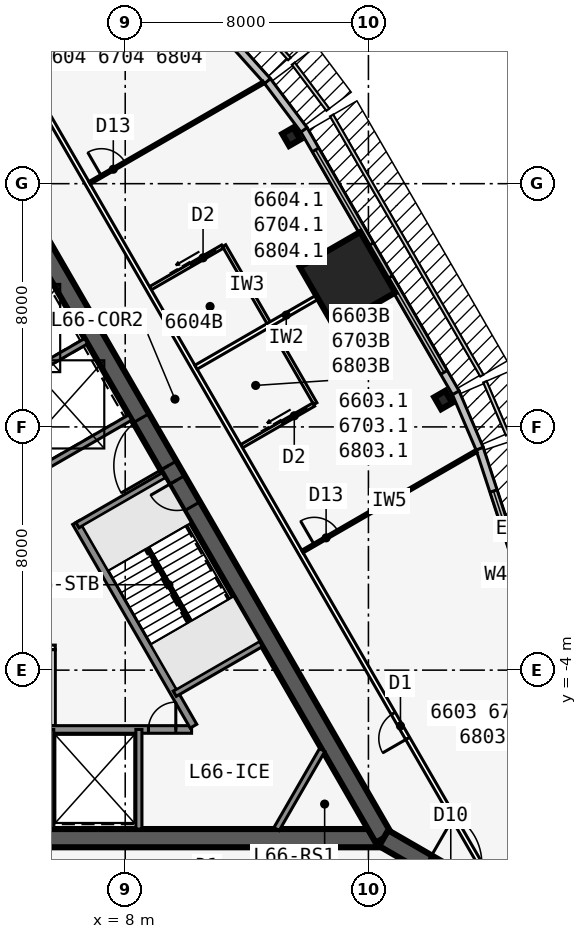
"""IFC4 building model, lengths in metres.
Left out: names, types, materials, properties, quantities, classifications, styles, units other than length and angle.
Written with IfcOpenShell. Run it as: python <this file> out.ifc"""

import sys

from ifc_helpers import new_model, si_unit, direction, frame, frame_2d, origin, origin_2d, place, context, subcontext, project, spatial, rectangle, i_section, extrude, element, fill, save


model = new_model("IFC4")
c1 = context("Model", 3, precision=1e-05, world=origin(), true_north=direction((0.0, 1.0)))
c2 = subcontext(c1, "Body", "Model", "MODEL_VIEW")
j1 = project(units=[si_unit("LENGTHUNIT", "METRE"), si_unit("PLANEANGLEUNIT", "RADIAN")], contexts=[c1])
p1 = place(None, origin())
s1 = spatial("IfcSite", under=j1, at=p1, CompositionType="ELEMENT")
p2 = place(p1, origin())
s2 = spatial("IfcBuilding", under=s1, at=p2, CompositionType="ELEMENT")
p3 = place(p2, frame((0.0, 0.0, 250.1)))
s3 = spatial("IfcBuildingStorey", under=s2, at=p3, CompositionType="ELEMENT", Elevation=250.1)
p4 = place(p3, frame((-16.5, -9.526, 0.0), z_axis=(0.0, 0.0, 1.0), x_axis=(1.0, 0.0, 0.0)))
e1 = element("IfcWall", 1, at=p4, inside=s3, PredefinedType="SHEAR", context=c2, shape_type="SweptSolid", body=[
    extrude(rectangle(XDim=33.0, YDim=0.6, at=frame_2d((16.5, 0.0))), origin(), (0.0, 0.0, 1.0), 3.6),
])
p5 = place(p4, frame((14.05, 0.0, 0.0)))
e2 = element("IfcOpeningElement", 2, at=p5, cuts=e1, PredefinedType="OPENING", context=c2, shape_type="SweptSolid", body=[
    extrude(rectangle(XDim=1.8, YDim=2.13, at=frame_2d((0.9, 1.065))), frame((0.0, 0.31, 0.0), z_axis=(0.0, -1.0, 0.0), x_axis=(1.0, 0.0, 0.0)), (0.0, 0.0, 1.0), 0.62),
])
p6 = place(p3, frame((-0.55, -5.951, 0.0), z_axis=(0.0, 0.0, 1.0), x_axis=(1.0, 0.0, 0.0)))
e3 = element("IfcWall", 3, at=p6, inside=s3, PredefinedType="SOLIDWALL", context=c2, shape_type="SweptSolid", body=[
    extrude(rectangle(XDim=10.733, YDim=0.25, at=frame_2d((5.366, 0.0))), origin(), (0.0, 0.0, 1.0), 3.435),
])
p7 = place(p6, frame((9.314, 0.0, 0.0)))
e4 = element("IfcOpeningElement", 4, at=p7, cuts=e3, PredefinedType="OPENING", context=c2, shape_type="SweptSolid", body=[
    extrude(rectangle(XDim=0.9, YDim=2.13, at=frame_2d((0.45, 1.065))), frame((0.0, 0.135, 0.0), z_axis=(0.0, -1.0, 0.0), x_axis=(1.0, 0.0, 0.0)), (0.0, 0.0, 1.0), 0.27),
])
p8 = place(p6, frame((1.05, 0.0, 0.0)))
e5 = element("IfcOpeningElement", 5, at=p8, cuts=e3, PredefinedType="OPENING", context=c2, shape_type="SweptSolid", body=[
    extrude(rectangle(XDim=1.1, YDim=2.13, at=frame_2d((0.55, 1.065))), frame((0.0, 0.135, 0.0), z_axis=(0.0, -1.0, 0.0), x_axis=(1.0, 0.0, 0.0)), (0.0, 0.0, 1.0), 0.27),
])
p9 = place(p6, frame((4.05, 0.0, 0.0)))
e6 = element("IfcOpeningElement", 6, at=p9, cuts=e3, PredefinedType="OPENING", context=c2, shape_type="SweptSolid", body=[
    extrude(rectangle(XDim=1.1, YDim=2.13, at=frame_2d((0.55, 1.065))), frame((0.0, 0.135, 0.0), z_axis=(0.0, -1.0, 0.0), x_axis=(1.0, 0.0, 0.0)), (0.0, 0.0, 1.0), 0.27),
])
for number, where, z_axis, x_axis in (
    (7, (5.55, -5.951, 0.0), (0.0, 0.0, 1.0), (0.0, -1.0, 0.0)),
    (8, (8.45, -5.951, 0.0), (0.0, 0.0, 1.0), (0.0, -1.0, 0.0)),
):
    element("IfcWall", number, at=place(p3, frame(where, z_axis=z_axis, x_axis=x_axis)), inside=s3, PredefinedType="SOLIDWALL", context=c2, shape_type="SweptSolid", body=[
        extrude(rectangle(XDim=3.275, YDim=0.2, at=frame_2d((1.637, 0.0))), origin(), (0.0, 0.0, 1.0), 3.435),
    ])
p10 = place(p3, frame((16.5, -9.526, 0.0), z_axis=(0.0, 0.0, 1.0), x_axis=(-0.499999749417, 0.866025548458, 0.0)))
e9 = element("IfcWall", 9, at=p10, inside=s3, PredefinedType="SHEAR", context=c2, shape_type="SweptSolid", body=[
    extrude(rectangle(XDim=33.0, YDim=0.6, at=frame_2d((16.5, 0.0))), origin(), (0.0, 0.0, 1.0), 3.6),
])
p11 = place(p10, frame((14.15, 0.0, 0.0)))
e10 = element("IfcOpeningElement", 10, at=p11, cuts=e9, PredefinedType="OPENING", context=c2, shape_type="SweptSolid", body=[
    extrude(rectangle(XDim=1.8, YDim=2.13, at=frame_2d((0.9, 1.065))), frame((0.0, 0.31, 0.0), z_axis=(0.0, -1.0, 0.0), x_axis=(1.0, 0.0, 0.0)), (0.0, 0.0, 1.0), 0.62),
])
p12 = place(p10, frame((12.6, 0.0, 0.0)))
e11 = element("IfcOpeningElement", 11, at=p12, cuts=e9, PredefinedType="OPENING", context=c2, shape_type="SweptSolid", body=[
    extrude(rectangle(XDim=1.0, YDim=2.13, at=frame_2d((0.5, 1.065))), frame((0.0, 0.31, 0.0), z_axis=(0.0, -1.0, 0.0), x_axis=(1.0, 0.0, 0.0)), (0.0, 0.0, 1.0), 0.62),
])
p13 = place(p3, frame((10.245, -5.843, 0.0), z_axis=(0.0, 0.0, 1.0), x_axis=(-0.499993009313, 0.866029439822, 0.0)))
e12 = element("IfcWall", 12, at=p13, inside=s3, PredefinedType="SOLIDWALL", context=c2, shape_type="SweptSolid", body=[
    extrude(rectangle(XDim=7.733, YDim=0.25, at=frame_2d((3.866, 0.0))), origin(), (0.0, 0.0, 1.0), 3.435),
])
p14 = place(p3, frame((9.629, -4.775, 0.0), z_axis=(0.0, 0.0, 1.0), x_axis=(0.865995643347, 0.500051543047, 0.0)))
e13 = element("IfcWall", 13, at=p14, inside=s3, PredefinedType="SOLIDWALL", context=c2, shape_type="SweptSolid", body=[
    extrude(rectangle(XDim=3.275, YDim=0.2, at=frame_2d((1.638, 0.0))), origin(), (0.0, 0.0, 1.0), 3.435),
])
for number, where, z_axis, x_axis in (
    (14, (6.429, 0.767, 0.0), (0.0, 0.0, 1.0), (0.866, 0.5, 0.0)),
    (15, (5.329, 2.673, 0.0), (0.0, 0.0, 1.0), (0.866, 0.5, 0.0)),
    (16, (3.879, 5.184, 0.0), (0.0, 0.0, 1.0), (0.866, 0.5, 0.0)),
):
    element("IfcWall", number, at=place(p3, frame(where, z_axis=z_axis, x_axis=x_axis)), inside=s3, PredefinedType="SOLIDWALL", context=c2, shape_type="SweptSolid", body=[
        extrude(rectangle(XDim=3.275, YDim=0.2, at=frame_2d((1.637, 0.0))), origin(), (0.0, 0.0, 1.0), 3.435),
    ])
p15 = place(p3, frame((16.5, -9.526, 0.0), z_axis=(0.0, 0.0, 1.0), x_axis=(0.866031398331, -0.499989616998, 0.0)))
e17 = element("IfcWall", 17, at=p15, inside=s3, PredefinedType="SHEAR", context=c2, shape_type="SweptSolid", body=[
    extrude(rectangle(XDim=4.746, YDim=0.6, at=frame_2d((2.373, 0.0))), origin(), (0.0, 0.0, 1.0), 3.6),
])
p16 = place(p15, frame((1.65, 0.0, 0.0)))
e18 = element("IfcOpeningElement", 18, at=p16, cuts=e17, PredefinedType="OPENING", context=c2, shape_type="SweptSolid", body=[
    extrude(rectangle(XDim=1.8, YDim=2.13, at=frame_2d((0.9, 1.065))), frame((0.0, 0.31, 0.0), z_axis=(0.0, -1.0, 0.0), x_axis=(1.0, 0.0, 0.0)), (0.0, 0.0, 1.0), 0.62),
])
for number, where, z_axis, x_axis in (
    (19, (18.461, 4.885, 0.0), (0.0, 0.0, 1.0), (0.866, 0.5, 0.0)),
    (20, (13.461, 13.545, 0.0), (0.0, 0.0, 1.0), (0.866, 0.5, 0.0)),
):
    element("IfcColumn", number, at=place(p3, frame(where, z_axis=z_axis, x_axis=x_axis)), inside=s3, PredefinedType="COLUMN", context=c2, shape_type="SweptSolid", body=[
        extrude(i_section(OverallWidth=0.419, OverallDepth=0.455, WebThickness=0.042, FlangeThickness=0.068, at=origin_2d()), origin(), (0.0, 0.0, 1.0), 3.6),
    ])
p17 = place(p3, frame((15.312, 8.84, 0.0), z_axis=(0.0, 0.0, 1.0), x_axis=(0.866025403784, 0.5, 0.0)))
e21 = element("IfcColumn", 21, at=p17, inside=s3, PredefinedType="COLUMN", context=c2, shape_type="SweptSolid", body=[
    extrude(rectangle(XDim=2.3, YDim=2.3, at=origin_2d()), origin(), (0.0, 0.0, 1.0), 3.6),
])
p18 = place(p3, frame((21.881, -3.503, 0.0), z_axis=(0.0, 0.0, 1.0), x_axis=(-0.311328857048, 0.95030223759, 0.0)))
e22 = element("IfcWall", 22, at=p18, inside=s3, PredefinedType="STANDARD", context=c2, shape_type="SweptSolid", body=[
    extrude(rectangle(XDim=7.153, YDim=0.25, at=frame_2d((3.576, 0.0))), origin(), (0.0, 0.0, 1.0), 3.435),
])
p19 = place(p18, frame((1.476, 0.0, 0.45)))
e23 = element("IfcOpeningElement", 23, at=p19, cuts=e22, PredefinedType="OPENING", context=c2, shape_type="SweptSolid", body=[
    extrude(rectangle(XDim=4.2, YDim=2.6, at=frame_2d((2.1, 1.3))), frame((0.0, 0.135, 0.0), z_axis=(0.0, -1.0, 0.0), x_axis=(1.0, 0.0, 0.0)), (0.0, 0.0, 1.0), 0.27),
])
p20 = place(p3, frame((19.658, 3.284, 0.0), z_axis=(0.0, 0.0, 1.0), x_axis=(-0.393290226175, 0.91941437774, 0.0)))
e24 = element("IfcWall", 24, at=p20, inside=s3, PredefinedType="STANDARD", context=c2, shape_type="SweptSolid", body=[
    extrude(rectangle(XDim=2.014, YDim=0.25, at=frame_2d((1.007, 0.0))), origin(), (0.0, 0.0, 1.0), 3.435),
])
p21 = place(p3, frame((18.873, 5.123, 0.0), z_axis=(0.0, 0.0, 1.0), x_axis=(-0.499993662806, 0.866029062534, 0.0)))
e25 = element("IfcWall", 25, at=p21, inside=s3, PredefinedType="STANDARD", context=c2, shape_type="SweptSolid", body=[
    extrude(rectangle(XDim=10.0, YDim=0.25, at=frame_2d((5.0, 0.0))), origin(), (0.0, 0.0, 1.0), 3.435),
])
p22 = place(p21, frame((0.775, 0.0, 0.45)))
e26 = element("IfcOpeningElement", 26, at=p22, cuts=e25, PredefinedType="OPENING", context=c2, shape_type="SweptSolid", body=[
    extrude(rectangle(XDim=3.6, YDim=2.6, at=frame_2d((1.8, 1.3))), frame((0.0, 0.135, 0.0), z_axis=(0.0, -1.0, 0.0), x_axis=(1.0, 0.0, 0.0)), (0.0, 0.0, 1.0), 0.27),
])
p23 = place(p21, frame((5.625, 0.0, 0.45)))
e27 = element("IfcOpeningElement", 27, at=p23, cuts=e25, PredefinedType="OPENING", context=c2, shape_type="SweptSolid", body=[
    extrude(rectangle(XDim=3.6, YDim=2.6, at=frame_2d((1.8, 1.3))), frame((0.0, 0.135, 0.0), z_axis=(0.0, -1.0, 0.0), x_axis=(1.0, 0.0, 0.0)), (0.0, 0.0, 1.0), 0.27),
])
p24 = place(p3, frame((13.881, 13.771, 0.0), z_axis=(0.0, 0.0, 1.0), x_axis=(-0.599650843534, 0.800261748335, 0.0)))
e28 = element("IfcWall", 28, at=p24, inside=s3, PredefinedType="STANDARD", context=c2, shape_type="SweptSolid", body=[
    extrude(rectangle(XDim=2.014, YDim=0.25, at=frame_2d((1.007, 0.0))), origin(), (0.0, 0.0, 1.0), 3.435),
])
p25 = place(p3, frame((12.68, 15.374, 0.0), z_axis=(0.0, 0.0, 1.0), x_axis=(-0.667303550892, 0.744785855778, 0.0)))
e29 = element("IfcWall", 29, at=p25, inside=s3, PredefinedType="STANDARD", context=c2, shape_type="SweptSolid", body=[
    extrude(rectangle(XDim=7.153, YDim=0.25, at=frame_2d((3.576, 0.0))), origin(), (0.0, 0.0, 1.0), 3.435),
])
p26 = place(p25, frame((1.476, 0.0, 0.45)))
e30 = element("IfcOpeningElement", 30, at=p26, cuts=e29, PredefinedType="OPENING", context=c2, shape_type="SweptSolid", body=[
    extrude(rectangle(XDim=4.2, YDim=2.6, at=frame_2d((2.1, 1.3))), frame((0.0, 0.135, 0.0), z_axis=(0.0, -1.0, 0.0), x_axis=(1.0, 0.0, 0.0)), (0.0, 0.0, 1.0), 0.27),
])
p27 = place(p3, frame((20.177, -11.245, 0.0), z_axis=(0.0, 0.0, 1.0), x_axis=(-0.499998875317, 0.866026053119, 0.0)))
e31 = element("IfcWall", 31, at=p27, inside=s3, PredefinedType="PARTITIONING", context=c2, shape_type="SweptSolid", body=[
    extrude(rectangle(XDim=39.654, YDim=0.15, at=frame_2d((19.827, 0.0))), origin(), (0.0, 0.0, 1.0), 3.435),
])
p28 = place(p27, frame((5.772, 0.0, 0.0)))
e32 = element("IfcOpeningElement", 32, at=p28, cuts=e31, PredefinedType="OPENING", context=c2, shape_type="SweptSolid", body=[
    extrude(rectangle(XDim=0.95, YDim=2.13, at=frame_2d((0.475, 1.065))), frame((0.0, 0.085, 0.0), z_axis=(0.0, -1.0, 0.0), x_axis=(1.0, 0.0, 0.0)), (0.0, 0.0, 1.0), 0.17),
])
p29 = place(p27, frame((32.932, 0.0, 0.0)))
e33 = element("IfcOpeningElement", 33, at=p29, cuts=e31, PredefinedType="OPENING", context=c2, shape_type="SweptSolid", body=[
    extrude(rectangle(XDim=0.95, YDim=2.13, at=frame_2d((0.475, 1.065))), frame((0.0, 0.085, 0.0), z_axis=(0.0, -1.0, 0.0), x_axis=(1.0, 0.0, 0.0)), (0.0, 0.0, 1.0), 0.17),
])
p30 = place(p3, frame((13.829, -0.099, 0.0), z_axis=(0.0, 0.0, 1.0), x_axis=(0.866022562216, 0.500004921708, 0.0)))
e34 = element("IfcWall", 34, at=p30, inside=s3, PredefinedType="PARTITIONING", context=c2, shape_type="SweptSolid", body=[
    extrude(rectangle(XDim=6.609, YDim=0.1, at=frame_2d((3.304, 0.0))), origin(), (0.0, 0.0, 1.0), 2.678),
])
p31 = place(p30, frame((0.45, 0.0, 0.0)))
e35 = element("IfcOpeningElement", 35, at=p31, cuts=e34, PredefinedType="OPENING", context=c2, shape_type="SweptSolid", body=[
    extrude(rectangle(XDim=0.9, YDim=2.13, at=frame_2d((0.45, 1.065))), frame((0.0, 0.06, 0.0), z_axis=(0.0, -1.0, 0.0), x_axis=(1.0, 0.0, 0.0)), (0.0, 0.0, 1.0), 0.12),
])
p32 = place(p3, frame((10.329, 5.963, 0.0), z_axis=(0.0, 0.0, 1.0), x_axis=(0.866011785882, 0.500023586156, 0.0)))
e36 = element("IfcWall", 36, at=p32, inside=s3, PredefinedType="PARTITIONING", context=c2, shape_type="SweptSolid", body=[
    extrude(rectangle(XDim=6.854, YDim=0.15, at=frame_2d((3.427, 0.0))), origin(), (0.0, 0.0, 1.0), 2.678),
])
p33 = place(p3, frame((6.829, 12.025, 0.0), z_axis=(0.0, 0.0, 1.0), x_axis=(0.866029323189, 0.499993211332, 0.0)))
e37 = element("IfcWall", 37, at=p33, inside=s3, PredefinedType="PARTITIONING", context=c2, shape_type="SweptSolid", body=[
    extrude(rectangle(XDim=6.608, YDim=0.1, at=frame_2d((3.304, 0.0))), origin(), (0.0, 0.0, 1.0), 2.678),
])
p34 = place(p33, frame((0.45, 0.0, 0.0)))
e38 = element("IfcOpeningElement", 38, at=p34, cuts=e37, PredefinedType="OPENING", context=c2, shape_type="SweptSolid", body=[
    extrude(rectangle(XDim=0.9, YDim=2.13, at=frame_2d((0.45, 1.065))), frame((0.0, 0.06, 0.0), z_axis=(0.0, -1.0, 0.0), x_axis=(1.0, 0.0, 0.0)), (0.0, 0.0, 1.0), 0.12),
])
p35 = place(p3, frame((14.253, 4.765, 0.0), z_axis=(0.0, 0.0, 1.0), x_axis=(-0.50002537861, 0.866010750942, 0.0)))
e39 = element("IfcWall", 39, at=p35, inside=s3, PredefinedType="PLUMBINGWALL", context=c2, shape_type="SweptSolid", body=[
    extrude(rectangle(XDim=3.0, YDim=0.12, at=frame_2d((1.5, 0.0))), origin(), (0.0, 0.0, 1.0), 3.435),
])
p36 = place(p3, frame((11.829, 3.365, 0.0), z_axis=(0.0, 0.0, 1.0), x_axis=(0.865997131366, 0.500048966069, 0.0)))
e40 = element("IfcWall", 40, at=p36, inside=s3, PredefinedType="PLUMBINGWALL", context=c2, shape_type="SweptSolid", body=[
    extrude(rectangle(XDim=2.74, YDim=0.12, at=frame_2d((1.37, 0.0))), origin(), (0.0, 0.0, 1.0), 3.435),
])
p37 = place(p36, frame((1.55, 0.0, 0.0)))
e41 = element("IfcOpeningElement", 41, at=p37, cuts=e40, PredefinedType="OPENING", context=c2, shape_type="SweptSolid", body=[
    extrude(rectangle(XDim=0.9, YDim=2.13, at=frame_2d((0.45, 1.065))), frame((0.0, 0.07, 0.0), z_axis=(0.0, -1.0, 0.0), x_axis=(1.0, 0.0, 0.0)), (0.0, 0.0, 1.0), 0.14),
])
p38 = place(p3, frame((12.753, 7.363, 0.0), z_axis=(0.0, 0.0, 1.0), x_axis=(-0.499990139034, 0.866031096941, 0.0)))
e42 = element("IfcWall", 42, at=p38, inside=s3, PredefinedType="PLUMBINGWALL", context=c2, shape_type="SweptSolid", body=[
    extrude(rectangle(XDim=3.0, YDim=0.12, at=frame_2d((1.5, 0.0))), origin(), (0.0, 0.0, 1.0), 3.435),
])
p39 = place(p3, frame((8.829, 8.561, 0.0), z_axis=(0.0, 0.0, 1.0), x_axis=(0.866035715982, 0.499982138324, 0.0)))
e43 = element("IfcWall", 43, at=p39, inside=s3, PredefinedType="PLUMBINGWALL", context=c2, shape_type="SweptSolid", body=[
    extrude(rectangle(XDim=2.74, YDim=0.12, at=frame_2d((1.37, 0.0))), origin(), (0.0, 0.0, 1.0), 3.435),
])
p40 = place(p39, frame((1.55, 0.0, 0.0)))
e44 = element("IfcOpeningElement", 44, at=p40, cuts=e43, PredefinedType="OPENING", context=c2, shape_type="SweptSolid", body=[
    extrude(rectangle(XDim=0.9, YDim=2.13, at=frame_2d((0.45, 1.065))), frame((0.0, 0.07, 0.0), z_axis=(0.0, -1.0, 0.0), x_axis=(1.0, 0.0, 0.0)), (0.0, 0.0, 1.0), 0.14),
])
p41 = place(p3, frame((-2.65, -3.251, 0.0), z_axis=(0.0, 0.0, 1.0), x_axis=(1.0, 0.0, 0.0)))
e45 = element("IfcWall", 45, at=p41, inside=s3, PredefinedType="PARTITIONING", context=c2, shape_type="SweptSolid", body=[
    extrude(rectangle(XDim=8.35, YDim=0.15, at=frame_2d((4.175, 0.0))), origin(), (0.0, 0.0, 1.0), 3.435),
])
p42 = place(p3, frame((5.625, -5.826, 0.0), z_axis=(0.0, 0.0, 1.0), x_axis=(0.0, 1.0, 0.0)))
e46 = element("IfcWall", 46, at=p42, inside=s3, PredefinedType="PARTITIONING", context=c2, shape_type="SweptSolid", body=[
    extrude(rectangle(XDim=2.5, YDim=0.15, at=frame_2d((1.25, 0.0))), origin(), (0.0, 0.0, 1.0), 3.435),
])
p43 = place(p3, frame((14.479, -6.626, 0.0), z_axis=(0.0, 0.0, 1.0), x_axis=(-0.499952404951, -0.866052881055, 0.0)))
e47 = element("IfcWall", 47, at=p43, inside=s3, PredefinedType="SOLIDWALL", context=c2, shape_type="SweptSolid", body=[
    extrude(rectangle(XDim=3.002, YDim=0.2, at=frame_2d((1.501, 0.0))), origin(), (0.0, 0.0, 1.0), 3.435),
])
p44 = place(p3, frame((10.135, -2.401, 0.0), z_axis=(0.0, 0.0, 1.0), x_axis=(-0.499992232847, 0.866029888106, 0.0)))
e48 = element("IfcWall", 48, at=p44, inside=s3, PredefinedType="SOLIDWALL", context=c2, shape_type="SweptSolid", body=[
    extrude(rectangle(XDim=2.794, YDim=0.1, at=frame_2d((1.397, 0.0))), origin(), (0.0, 0.0, 1.0), 3.6),
])
p45 = place(p19, origin())
e49 = element("IfcWindow", 49, at=p45, inside=s3, PartitioningType="SINGLE_PANEL", PredefinedType="WINDOW", context=c2, shape_type="SweptSolid", body=[
    extrude(rectangle(XDim=4.2, YDim=2.6, at=frame_2d((2.1, 1.3))), frame((0.0, 0.03, 0.0), z_axis=(0.0, -1.0, 0.0), x_axis=(1.0, 0.0, 0.0)), (0.0, 0.0, 1.0), 0.06),
])
fill(e23, e49)
p46 = place(p22, origin())
e50 = element("IfcWindow", 50, at=p46, inside=s3, PartitioningType="SINGLE_PANEL", PredefinedType="WINDOW", context=c2, shape_type="SweptSolid", body=[
    extrude(rectangle(XDim=3.6, YDim=2.6, at=frame_2d((1.8, 1.3))), frame((0.0, 0.03, 0.0), z_axis=(0.0, -1.0, 0.0), x_axis=(1.0, 0.0, 0.0)), (0.0, 0.0, 1.0), 0.06),
])
fill(e26, e50)
p47 = place(p23, origin())
e51 = element("IfcWindow", 51, at=p47, inside=s3, PartitioningType="SINGLE_PANEL", PredefinedType="WINDOW", context=c2, shape_type="SweptSolid", body=[
    extrude(rectangle(XDim=3.6, YDim=2.6, at=frame_2d((1.8, 1.3))), frame((0.0, 0.03, 0.0), z_axis=(0.0, -1.0, 0.0), x_axis=(1.0, 0.0, 0.0)), (0.0, 0.0, 1.0), 0.06),
])
fill(e27, e51)
p48 = place(p31, origin())
e52 = element("IfcDoor", 52, at=p48, inside=s3, OperationType="SINGLE_SWING_LEFT", PredefinedType="DOOR", context=c2, shape_type="SweptSolid", body=[
    extrude(rectangle(XDim=0.9, YDim=2.13, at=frame_2d((0.45, 1.065))), frame((0.0, 0.025, 0.0), z_axis=(0.0, -1.0, 0.0), x_axis=(1.0, 0.0, 0.0)), (0.0, 0.0, 1.0), 0.05),
])
fill(e35, e52)
p49 = place(p34, origin())
e53 = element("IfcDoor", 53, at=p49, inside=s3, OperationType="SINGLE_SWING_LEFT", PredefinedType="DOOR", context=c2, shape_type="SweptSolid", body=[
    extrude(rectangle(XDim=0.9, YDim=2.13, at=frame_2d((0.45, 1.065))), frame((0.0, 0.025, 0.0), z_axis=(0.0, -1.0, 0.0), x_axis=(1.0, 0.0, 0.0)), (0.0, 0.0, 1.0), 0.05),
])
fill(e38, e53)
p50 = place(p28, origin())
e54 = element("IfcDoor", 54, at=p50, inside=s3, OperationType="SINGLE_SWING_LEFT", PredefinedType="DOOR", context=c2, shape_type="SweptSolid", body=[
    extrude(rectangle(XDim=0.95, YDim=2.13, at=frame_2d((0.475, 1.065))), frame((0.0, 0.025, 0.0), z_axis=(0.0, -1.0, 0.0), x_axis=(1.0, 0.0, 0.0)), (0.0, 0.0, 1.0), 0.05),
])
fill(e32, e54)
p51 = place(p37, origin())
e55 = element("IfcDoor", 55, at=p51, inside=s3, OperationType="SLIDING_TO_LEFT", PredefinedType="DOOR", context=c2, shape_type="SweptSolid", body=[
    extrude(rectangle(XDim=0.9, YDim=2.13, at=frame_2d((0.45, 1.065))), frame((0.0, 0.025, 0.0), z_axis=(0.0, -1.0, 0.0), x_axis=(1.0, 0.0, 0.0)), (0.0, 0.0, 1.0), 0.05),
])
fill(e41, e55)
p52 = place(p40, origin())
e56 = element("IfcDoor", 56, at=p52, inside=s3, OperationType="SLIDING_TO_LEFT", PredefinedType="DOOR", context=c2, shape_type="SweptSolid", body=[
    extrude(rectangle(XDim=0.9, YDim=2.13, at=frame_2d((0.45, 1.065))), frame((0.0, 0.025, 0.0), z_axis=(0.0, -1.0, 0.0), x_axis=(1.0, 0.0, 0.0)), (0.0, 0.0, 1.0), 0.05),
])
fill(e44, e56)
p53 = place(p11, origin())
e57 = element("IfcDoor", 57, at=p53, inside=s3, OperationType="DOUBLE_DOOR_SINGLE_SWING", PredefinedType="DOOR", context=c2, shape_type="SweptSolid", body=[
    extrude(rectangle(XDim=1.8, YDim=2.13, at=frame_2d((0.9, 1.065))), frame((0.0, 0.025, 0.0), z_axis=(0.0, -1.0, 0.0), x_axis=(1.0, 0.0, 0.0)), (0.0, 0.0, 1.0), 0.05),
])
fill(e10, e57)
p54 = place(p12, origin())
e58 = element("IfcDoor", 58, at=p54, inside=s3, OperationType="SINGLE_SWING_RIGHT", PredefinedType="DOOR", context=c2, shape_type="SweptSolid", body=[
    extrude(rectangle(XDim=1.0, YDim=2.13, at=frame_2d((0.5, 1.065))), frame((0.0, 0.025, 0.0), z_axis=(0.0, -1.0, 0.0), x_axis=(1.0, 0.0, 0.0)), (0.0, 0.0, 1.0), 0.05),
])
fill(e11, e58)
p55 = place(p7, origin())
e59 = element("IfcDoor", 59, at=p55, inside=s3, OperationType="SINGLE_SWING_RIGHT", PredefinedType="DOOR", context=c2, shape_type="SweptSolid", body=[
    extrude(rectangle(XDim=0.9, YDim=2.13, at=frame_2d((0.45, 1.065))), frame((0.0, 0.025, 0.0), z_axis=(0.0, -1.0, 0.0), x_axis=(1.0, 0.0, 0.0)), (0.0, 0.0, 1.0), 0.05),
])
fill(e4, e59)
save(model, sys.argv[1])
